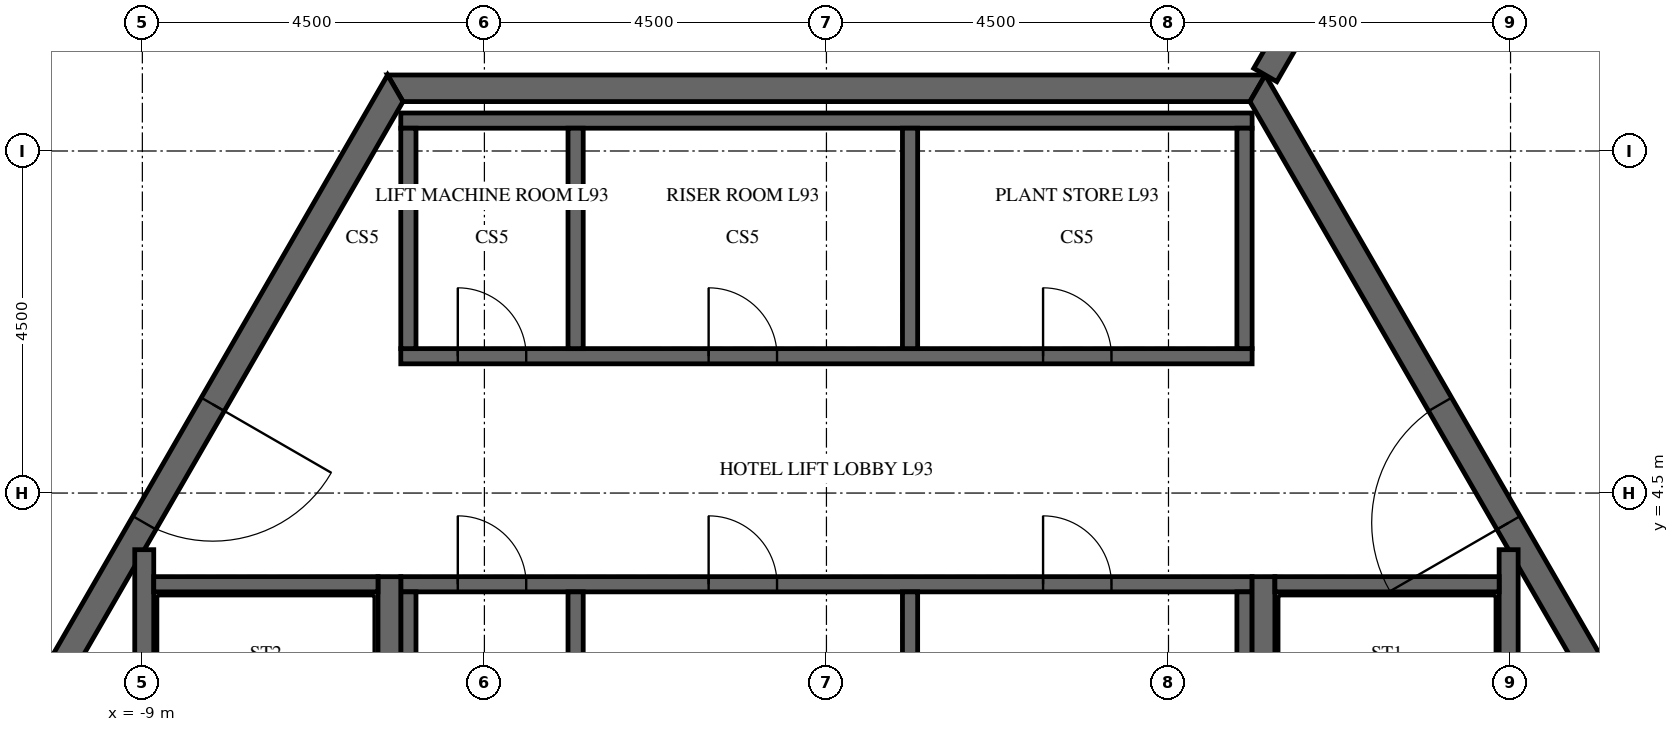
"""IFC4 building model, lengths in metres.
Left out: names, types, materials, properties, quantities, classifications, styles, units other than length and angle.
Written with IfcOpenShell. Run it as: python <this file> out.ifc"""

import sys

from ifc_helpers import new_model, si_unit, direction, frame, frame_2d, origin, place, context, subcontext, project, spatial, polyline, rectangle, outline, extrude, element, fill, save


model = new_model("IFC4")
c1 = context("Model", 3, precision=1e-05, world=origin(), true_north=direction((0.0, 1.0)))
c2 = subcontext(c1, "Body", "Model", "MODEL_VIEW")
j1 = project(units=[si_unit("LENGTHUNIT", "METRE"), si_unit("PLANEANGLEUNIT", "RADIAN")], contexts=[c1])
p1 = place(None, origin())
s1 = spatial("IfcSite", under=j1, at=p1, CompositionType="ELEMENT")
p2 = place(p1, origin())
s2 = spatial("IfcBuilding", under=s1, at=p2, CompositionType="ELEMENT")
p3 = place(p2, frame((0.0, 0.0, 392.7)))
s3 = spatial("IfcBuildingStorey", under=s2, at=p3, CompositionType="ELEMENT", Elevation=392.7)
p4 = place(p3, frame((-5.673, 9.825, -0.2), z_axis=(0.0, 0.0, 1.0), x_axis=(-0.499995046907, -0.866028263435, 0.0)))
e1 = element("IfcWall", 1, at=p4, inside=s3, PredefinedType="SHEAR", context=c2, shape_type="SweptSolid", body=[
    extrude(outline(polyline([(-0.101, -0.175), (11.446, -0.175), (11.244, 0.175), (0.101, 0.175), (-0.101, -0.175)])), origin(), (0.0, 0.0, 1.0), 4.5),
])
p5 = place(p4, frame((4.801, 0.0, 0.2)))
e2 = element("IfcOpeningElement", 2, at=p5, cuts=e1, PredefinedType="OPENING", context=c2, shape_type="SweptSolid", body=[
    extrude(rectangle(XDim=1.8, YDim=2.4, at=frame_2d((0.9, 1.2))), frame((0.0, 0.185, 0.0), z_axis=(0.0, -1.0, 0.0), x_axis=(1.0, 0.0, 0.0)), (0.0, 0.0, 1.0), 0.37),
])
p6 = place(p3, frame((11.345, 0.0, -0.2), z_axis=(0.0, 0.0, 1.0), x_axis=(-0.499995046907, 0.866028263435, 0.0)))
e3 = element("IfcWall", 3, at=p6, inside=s3, PredefinedType="SHEAR", context=c2, shape_type="SweptSolid", body=[
    extrude(outline(polyline([(-0.101, -0.175), (11.446, -0.175), (11.244, 0.175), (0.101, 0.175), (-0.101, -0.175)])), origin(), (0.0, 0.0, 1.0), 4.5),
])
p7 = place(p6, frame((4.744, 0.0, 0.2)))
e4 = element("IfcOpeningElement", 4, at=p7, cuts=e3, PredefinedType="OPENING", context=c2, shape_type="SweptSolid", body=[
    extrude(rectangle(XDim=1.8, YDim=2.4, at=frame_2d((0.9, 1.2))), frame((0.0, 0.185, 0.0), z_axis=(0.0, -1.0, 0.0), x_axis=(1.0, 0.0, 0.0)), (0.0, 0.0, 1.0), 0.37),
])
p8 = place(p3, frame((5.673, 9.825, -0.2), z_axis=(0.0, 0.0, 1.0), x_axis=(-1.0, 0.0, 0.0)))
e5 = element("IfcWall", 5, at=p8, inside=s3, PredefinedType="SHEAR", context=c2, shape_type="SweptSolid", body=[
    extrude(outline(polyline([(-0.101, -0.175), (11.446, -0.175), (11.244, 0.175), (0.101, 0.175), (-0.101, -0.175)])), origin(), (0.0, 0.0, 1.0), 4.5),
])
p9 = place(p3, frame((5.773, 10.0, -0.2), z_axis=(0.0, 0.0, 1.0), x_axis=(0.500006102154, 0.866021880676, 0.0)))
e6 = element("IfcWall", 6, at=p9, inside=s3, PredefinedType="SHEAR", context=c2, shape_type="SweptSolid", body=[
    extrude(rectangle(XDim=9.065, YDim=0.35, at=frame_2d((4.532, 0.0))), origin(), (0.0, 0.0, 1.0), 4.5),
])
p10 = place(p9, frame((3.632, 0.0, 0.2)))
e7 = element("IfcOpeningElement", 7, at=p10, cuts=e6, PredefinedType="OPENING", context=c2, shape_type="SweptSolid", body=[
    extrude(rectangle(XDim=1.8, YDim=2.4, at=frame_2d((0.9, 1.2))), frame((0.0, 0.185, 0.0), z_axis=(0.0, -1.0, 0.0), x_axis=(1.0, 0.0, 0.0)), (0.0, 0.0, 1.0), 0.37),
])
p11 = place(p3, frame((-5.6, 6.3, -0.2), z_axis=(0.0, 0.0, 1.0), x_axis=(1.0, 0.0, 0.0)))
e8 = element("IfcWall", 8, at=p11, inside=s3, PredefinedType="SHEAR", context=c2, shape_type="SweptSolid", body=[
    extrude(rectangle(XDim=11.2, YDim=0.2, at=frame_2d((5.6, 0.0))), origin(), (0.0, 0.0, 1.0), 4.5),
])
p12 = place(p11, frame((0.75, 0.0, 0.2)))
e9 = element("IfcOpeningElement", 9, at=p12, cuts=e8, PredefinedType="OPENING", context=c2, shape_type="SweptSolid", body=[
    extrude(rectangle(XDim=0.9, YDim=2.1, at=frame_2d((0.45, 1.05))), frame((0.0, 0.11, 0.0), z_axis=(0.0, -1.0, 0.0), x_axis=(1.0, 0.0, 0.0)), (0.0, 0.0, 1.0), 0.22),
])
p13 = place(p11, frame((4.05, 0.0, 0.2)))
e10 = element("IfcOpeningElement", 10, at=p13, cuts=e8, PredefinedType="OPENING", context=c2, shape_type="SweptSolid", body=[
    extrude(rectangle(XDim=0.9, YDim=2.1, at=frame_2d((0.45, 1.05))), frame((0.0, 0.11, 0.0), z_axis=(0.0, -1.0, 0.0), x_axis=(1.0, 0.0, 0.0)), (0.0, 0.0, 1.0), 0.22),
])
p14 = place(p11, frame((8.45, 0.0, 0.2)))
e11 = element("IfcOpeningElement", 11, at=p14, cuts=e8, PredefinedType="OPENING", context=c2, shape_type="SweptSolid", body=[
    extrude(rectangle(XDim=0.9, YDim=2.1, at=frame_2d((0.45, 1.05))), frame((0.0, 0.11, 0.0), z_axis=(0.0, -1.0, 0.0), x_axis=(1.0, 0.0, 0.0)), (0.0, 0.0, 1.0), 0.22),
])
p15 = place(p3, frame((-5.6, 9.4, -0.2), z_axis=(0.0, 0.0, 1.0), x_axis=(1.0, 0.0, 0.0)))
e12 = element("IfcWall", 12, at=p15, inside=s3, PredefinedType="SHEAR", context=c2, shape_type="SweptSolid", body=[
    extrude(rectangle(XDim=11.2, YDim=0.2, at=frame_2d((5.6, 0.0))), origin(), (0.0, 0.0, 1.0), 4.5),
])
for number, where, z_axis, x_axis in (
    (13, (-5.5, 6.4, -0.2), (0.0, 0.0, 1.0), (0.0, 1.0, 0.0)),
    (14, (-3.3, 6.4, -0.2), (0.0, 0.0, 1.0), (0.0, 1.0, 0.0)),
    (15, (1.1, 6.4, -0.2), (0.0, 0.0, 1.0), (0.0, 1.0, 0.0)),
    (16, (5.5, 6.4, -0.2), (0.0, 0.0, 1.0), (0.0, 1.0, 0.0)),
):
    element("IfcWall", number, at=place(p3, frame(where, z_axis=z_axis, x_axis=x_axis)), inside=s3, PredefinedType="SHEAR", context=c2, shape_type="SweptSolid", body=[
        extrude(rectangle(XDim=2.9, YDim=0.2, at=frame_2d((1.45, 0.0))), origin(), (0.0, 0.0, 1.0), 4.5),
    ])
p16 = place(p3, frame((-5.6, 3.3, -0.2), z_axis=(0.0, 0.0, 1.0), x_axis=(1.0, 0.0, 0.0)))
e17 = element("IfcWall", 17, at=p16, inside=s3, PredefinedType="SHEAR", context=c2, shape_type="SweptSolid", body=[
    extrude(rectangle(XDim=11.2, YDim=0.2, at=frame_2d((5.6, 0.0))), origin(), (0.0, 0.0, 1.0), 4.5),
])
p17 = place(p16, frame((0.75, 0.0, 0.2)))
e18 = element("IfcOpeningElement", 18, at=p17, cuts=e17, PredefinedType="OPENING", context=c2, shape_type="SweptSolid", body=[
    extrude(rectangle(XDim=0.9, YDim=2.1, at=frame_2d((0.45, 1.05))), frame((0.0, 0.11, 0.0), z_axis=(0.0, -1.0, 0.0), x_axis=(1.0, 0.0, 0.0)), (0.0, 0.0, 1.0), 0.22),
])
p18 = place(p16, frame((4.05, 0.0, 0.2)))
e19 = element("IfcOpeningElement", 19, at=p18, cuts=e17, PredefinedType="OPENING", context=c2, shape_type="SweptSolid", body=[
    extrude(rectangle(XDim=0.9, YDim=2.1, at=frame_2d((0.45, 1.05))), frame((0.0, 0.11, 0.0), z_axis=(0.0, -1.0, 0.0), x_axis=(1.0, 0.0, 0.0)), (0.0, 0.0, 1.0), 0.22),
])
p19 = place(p16, frame((8.45, 0.0, 0.2)))
e20 = element("IfcOpeningElement", 20, at=p19, cuts=e17, PredefinedType="OPENING", context=c2, shape_type="SweptSolid", body=[
    extrude(rectangle(XDim=0.9, YDim=2.1, at=frame_2d((0.45, 1.05))), frame((0.0, 0.11, 0.0), z_axis=(0.0, -1.0, 0.0), x_axis=(1.0, 0.0, 0.0)), (0.0, 0.0, 1.0), 0.22),
])
for number, where, z_axis, x_axis in (
    (21, (-5.5, 0.1, -0.2), (0.0, 0.0, 1.0), (0.0, 1.0, 0.0)),
    (22, (-3.3, 0.1, -0.2), (0.0, 0.0, 1.0), (0.0, 1.0, 0.0)),
    (23, (1.1, 0.1, -0.2), (0.0, 0.0, 1.0), (0.0, 1.0, 0.0)),
    (24, (5.5, 0.1, -0.2), (0.0, 0.0, 1.0), (0.0, 1.0, 0.0)),
):
    element("IfcWall", number, at=place(p3, frame(where, z_axis=z_axis, x_axis=x_axis)), inside=s3, PredefinedType="SHEAR", context=c2, shape_type="SweptSolid", body=[
        extrude(rectangle(XDim=3.1, YDim=0.2, at=frame_2d((1.55, 0.0))), origin(), (0.0, 0.0, 1.0), 4.5),
    ])
p20 = place(p3, frame((5.75, -3.4, -0.2), z_axis=(0.0, 0.0, 1.0), x_axis=(0.0, 1.0, 0.0)))
e25 = element("IfcWall", 25, at=p20, inside=s3, PredefinedType="SHEAR", context=c2, shape_type="SweptSolid", body=[
    extrude(rectangle(XDim=6.8, YDim=0.3, at=frame_2d((3.4, 0.0))), origin(), (0.0, 0.0, 1.0), 4.5),
])
p21 = place(p3, frame((8.975, -3.755, -0.2), z_axis=(0.0, 0.0, 1.0), x_axis=(0.0, 1.0, 0.0)))
e26 = element("IfcWall", 26, at=p21, inside=s3, PredefinedType="SHEAR", context=c2, shape_type="SweptSolid", body=[
    extrude(rectangle(XDim=7.51, YDim=0.25, at=frame_2d((3.755, 0.0))), origin(), (0.0, 0.0, 1.0), 4.5),
])
p22 = place(p3, frame((5.9, 3.3, -0.2), z_axis=(0.0, 0.0, 1.0), x_axis=(1.0, 0.0, 0.0)))
e27 = element("IfcWall", 27, at=p22, inside=s3, PredefinedType="SHEAR", context=c2, shape_type="SweptSolid", body=[
    extrude(rectangle(XDim=2.95, YDim=0.2, at=frame_2d((1.475, 0.0))), origin(), (0.0, 0.0, 1.0), 4.5),
])
p23 = place(p3, frame((-5.75, -3.4, -0.2), z_axis=(0.0, 0.0, 1.0), x_axis=(0.0, 1.0, 0.0)))
e28 = element("IfcWall", 28, at=p23, inside=s3, PredefinedType="SHEAR", context=c2, shape_type="SweptSolid", body=[
    extrude(rectangle(XDim=6.8, YDim=0.3, at=frame_2d((3.4, 0.0))), origin(), (0.0, 0.0, 1.0), 4.5),
])
p24 = place(p3, frame((-8.975, -3.755, -0.2), z_axis=(0.0, 0.0, 1.0), x_axis=(0.0, 1.0, 0.0)))
e29 = element("IfcWall", 29, at=p24, inside=s3, PredefinedType="SHEAR", context=c2, shape_type="SweptSolid", body=[
    extrude(rectangle(XDim=7.51, YDim=0.25, at=frame_2d((3.755, 0.0))), origin(), (0.0, 0.0, 1.0), 4.5),
])
p25 = place(p3, frame((-8.85, 3.3, -0.2), z_axis=(0.0, 0.0, 1.0), x_axis=(1.0, 0.0, 0.0)))
e30 = element("IfcWall", 30, at=p25, inside=s3, PredefinedType="SHEAR", context=c2, shape_type="SweptSolid", body=[
    extrude(rectangle(XDim=2.95, YDim=0.2, at=frame_2d((1.475, 0.0))), origin(), (0.0, 0.0, 1.0), 4.5),
])
p26 = place(p3, frame((10.193, 17.305, 0.0), z_axis=(0.0, 0.0, 1.0), x_axis=(0.500004628935, -0.866022731251, 0.0)))
e31 = element("IfcWall", 31, at=p26, inside=s3, PredefinedType="PARTITIONING", context=c2, shape_type="SweptSolid", body=[
    extrude(rectangle(XDim=13.606, YDim=0.15, at=frame_2d((6.803, 0.0))), origin(), (0.0, 0.0, 1.0), 4.3),
])
p27 = place(p26, frame((6.303, 0.0, 0.0)))
e32 = element("IfcOpeningElement", 32, at=p27, cuts=e31, PredefinedType="OPENING", context=c2, shape_type="SweptSolid", body=[
    extrude(rectangle(XDim=1.0, YDim=2.1, at=frame_2d((0.5, 1.05))), frame((0.0, 0.085, 0.0), z_axis=(0.0, -1.0, 0.0), x_axis=(1.0, 0.0, 0.0)), (0.0, 0.0, 1.0), 0.17),
])
p28 = place(p5, origin())
e33 = element("IfcDoor", 33, at=p28, inside=s3, OperationType="DOUBLE_DOOR_SINGLE_SWING", PredefinedType="DOOR", context=c2, shape_type="SweptSolid", body=[
    extrude(rectangle(XDim=1.8, YDim=2.4, at=frame_2d((0.9, 1.2))), frame((0.0, 0.025, 0.0), z_axis=(0.0, -1.0, 0.0), x_axis=(1.0, 0.0, 0.0)), (0.0, 0.0, 1.0), 0.05),
])
fill(e2, e33)
p29 = place(p7, origin())
e34 = element("IfcDoor", 34, at=p29, inside=s3, OperationType="DOUBLE_DOOR_SINGLE_SWING", PredefinedType="DOOR", context=c2, shape_type="SweptSolid", body=[
    extrude(rectangle(XDim=1.8, YDim=2.4, at=frame_2d((0.9, 1.2))), frame((0.0, 0.025, 0.0), z_axis=(0.0, -1.0, 0.0), x_axis=(1.0, 0.0, 0.0)), (0.0, 0.0, 1.0), 0.05),
])
fill(e4, e34)
p30 = place(p12, origin())
e35 = element("IfcDoor", 35, at=p30, inside=s3, OperationType="SINGLE_SWING_LEFT", PredefinedType="DOOR", context=c2, shape_type="SweptSolid", body=[
    extrude(rectangle(XDim=0.9, YDim=2.1, at=frame_2d((0.45, 1.05))), frame((0.0, 0.025, 0.0), z_axis=(0.0, -1.0, 0.0), x_axis=(1.0, 0.0, 0.0)), (0.0, 0.0, 1.0), 0.05),
])
fill(e9, e35)
p31 = place(p13, origin())
e36 = element("IfcDoor", 36, at=p31, inside=s3, OperationType="SINGLE_SWING_LEFT", PredefinedType="DOOR", context=c2, shape_type="SweptSolid", body=[
    extrude(rectangle(XDim=0.9, YDim=2.1, at=frame_2d((0.45, 1.05))), frame((0.0, 0.025, 0.0), z_axis=(0.0, -1.0, 0.0), x_axis=(1.0, 0.0, 0.0)), (0.0, 0.0, 1.0), 0.05),
])
fill(e10, e36)
p32 = place(p14, origin())
e37 = element("IfcDoor", 37, at=p32, inside=s3, OperationType="SINGLE_SWING_LEFT", PredefinedType="DOOR", context=c2, shape_type="SweptSolid", body=[
    extrude(rectangle(XDim=0.9, YDim=2.1, at=frame_2d((0.45, 1.05))), frame((0.0, 0.025, 0.0), z_axis=(0.0, -1.0, 0.0), x_axis=(1.0, 0.0, 0.0)), (0.0, 0.0, 1.0), 0.05),
])
fill(e11, e37)
p33 = place(p17, origin())
e38 = element("IfcDoor", 38, at=p33, inside=s3, OperationType="SINGLE_SWING_LEFT", PredefinedType="DOOR", context=c2, shape_type="SweptSolid", body=[
    extrude(rectangle(XDim=0.9, YDim=2.1, at=frame_2d((0.45, 1.05))), frame((0.0, 0.025, 0.0), z_axis=(0.0, -1.0, 0.0), x_axis=(1.0, 0.0, 0.0)), (0.0, 0.0, 1.0), 0.05),
])
fill(e18, e38)
p34 = place(p18, origin())
e39 = element("IfcDoor", 39, at=p34, inside=s3, OperationType="SINGLE_SWING_LEFT", PredefinedType="DOOR", context=c2, shape_type="SweptSolid", body=[
    extrude(rectangle(XDim=0.9, YDim=2.1, at=frame_2d((0.45, 1.05))), frame((0.0, 0.025, 0.0), z_axis=(0.0, -1.0, 0.0), x_axis=(1.0, 0.0, 0.0)), (0.0, 0.0, 1.0), 0.05),
])
fill(e19, e39)
p35 = place(p19, origin())
e40 = element("IfcDoor", 40, at=p35, inside=s3, OperationType="SINGLE_SWING_LEFT", PredefinedType="DOOR", context=c2, shape_type="SweptSolid", body=[
    extrude(rectangle(XDim=0.9, YDim=2.1, at=frame_2d((0.45, 1.05))), frame((0.0, 0.025, 0.0), z_axis=(0.0, -1.0, 0.0), x_axis=(1.0, 0.0, 0.0)), (0.0, 0.0, 1.0), 0.05),
])
fill(e20, e40)
save(model, sys.argv[1])
